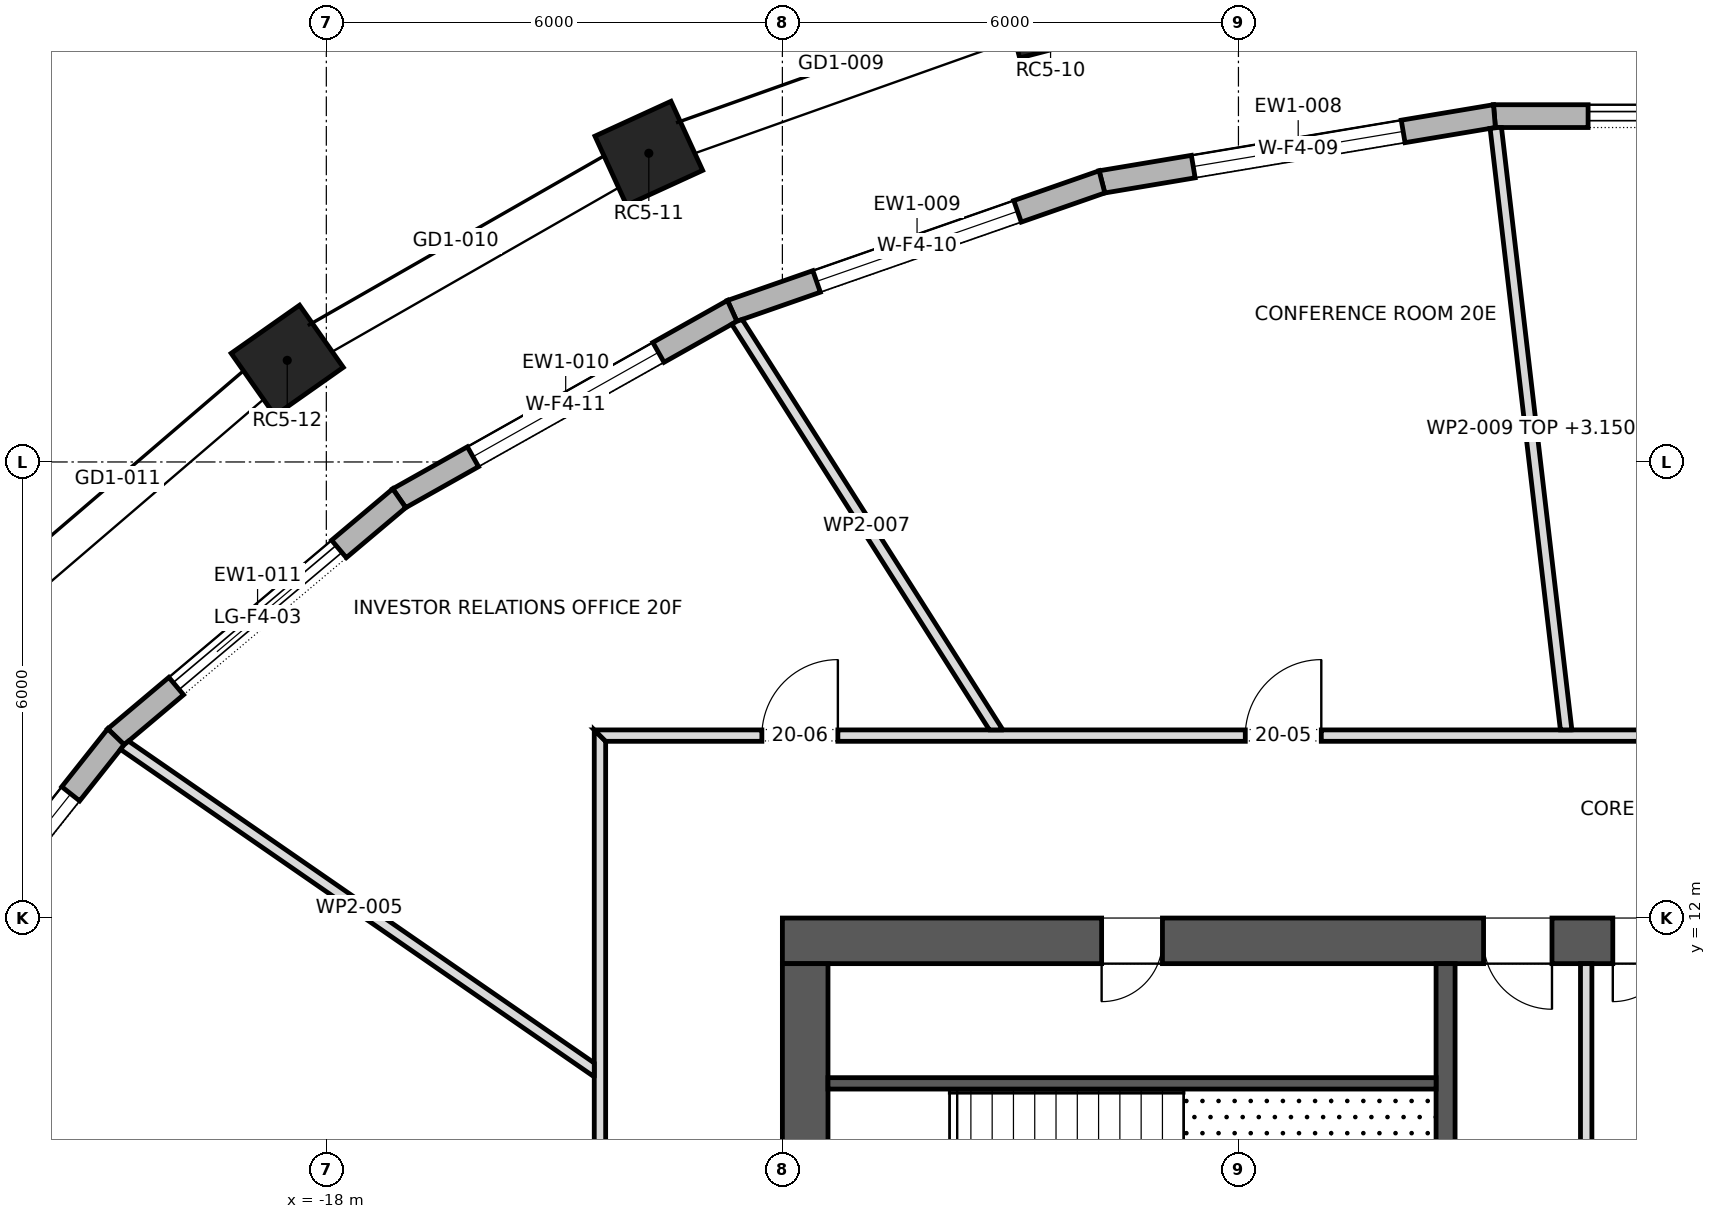
"""IFC4 building model, lengths in metres.
Left out: names, types, materials, properties, quantities, classifications, styles, units other than length and angle.
Written with IfcOpenShell. Run it as: python <this file> out.ifc"""

import sys

from ifc_helpers import new_model, si_unit, direction, frame, frame_2d, origin, origin_2d, place, context, subcontext, project, spatial, polyline, rectangle, outline, extrude, element, fill, save


model = new_model("IFC4")
c1 = context("Model", 3, precision=1e-05, world=origin(), true_north=direction((0.0, 1.0)))
c2 = subcontext(c1, "Body", "Model", "MODEL_VIEW")
j1 = project(units=[si_unit("LENGTHUNIT", "METRE"), si_unit("PLANEANGLEUNIT", "RADIAN")], contexts=[c1])
p1 = place(None, origin())
s1 = spatial("IfcSite", under=j1, at=p1, CompositionType="ELEMENT")
p2 = place(p1, origin())
s2 = spatial("IfcBuilding", under=s1, at=p2, CompositionType="ELEMENT")
p3 = place(p2, frame((0.0, 0.0, 288.3)))
s3 = spatial("IfcBuildingStorey", under=s2, at=p3, CompositionType="ELEMENT", Elevation=288.3)
for number, where, z_axis, x_axis in (
    (1, (-8.472, 23.938, 0.0), (0.0, 0.0, 1.0), (-0.968, -0.252, 0.0)),
    (2, (-13.757, 22.061, 0.0), (0.0, 0.0, 1.0), (-0.909, -0.417, 0.0)),
    (3, (-18.514, 19.337, 0.0), (0.0, 0.0, 1.0), (-0.818, -0.575, 0.0)),
):
    element("IfcColumn", number, at=place(p3, frame(where, z_axis=z_axis, x_axis=x_axis)), inside=s3, PredefinedType="COLUMN", context=c2, shape_type="SweptSolid", body=[
        extrude(rectangle(XDim=1.1, YDim=1.0, at=origin_2d()), origin(), (0.0, 0.0, 1.0), 4.0),
    ])
p4 = place(p3, frame((-12.0, 11.7, 0.0), z_axis=(0.0, 0.0, 1.0), x_axis=(1.0, 0.0, 0.0)))
e4 = element("IfcWall", 4, at=p4, inside=s3, PredefinedType="SHEAR", context=c2, shape_type="SweptSolid", body=[
    extrude(rectangle(XDim=24.0, YDim=0.6, at=frame_2d((12.0, 0.0))), origin(), (0.0, 0.0, 1.0), 4.0),
])
p5 = place(p4, frame((9.225, 0.0, 0.0)))
e5 = element("IfcOpeningElement", 5, at=p5, cuts=e4, PredefinedType="OPENING", context=c2, shape_type="SweptSolid", body=[
    extrude(rectangle(XDim=0.9, YDim=2.1, at=frame_2d((0.45, 1.05))), frame((0.0, 0.312, 0.0), z_axis=(0.0, -1.0, 0.0), x_axis=(1.0, 0.0, 0.0)), (0.0, 0.0, 1.0), 0.624),
])
p6 = place(p4, frame((10.925, 0.0, 0.0)))
e6 = element("IfcOpeningElement", 6, at=p6, cuts=e4, PredefinedType="OPENING", context=c2, shape_type="SweptSolid", body=[
    extrude(rectangle(XDim=0.8, YDim=2.1, at=frame_2d((0.4, 1.05))), frame((0.0, 0.312, 0.0), z_axis=(0.0, -1.0, 0.0), x_axis=(1.0, 0.0, 0.0)), (0.0, 0.0, 1.0), 0.624),
])
p7 = place(p4, frame((4.2, 0.0, 0.0)))
e7 = element("IfcOpeningElement", 7, at=p7, cuts=e4, PredefinedType="OPENING", context=c2, shape_type="SweptSolid", body=[
    extrude(rectangle(XDim=0.8, YDim=2.1, at=frame_2d((0.4, 1.05))), frame((0.0, 0.312, 0.0), z_axis=(0.0, -1.0, 0.0), x_axis=(1.0, 0.0, 0.0)), (0.0, 0.0, 1.0), 0.624),
])
p8 = place(p4, frame((13.8, 0.0, 0.0)))
e8 = element("IfcOpeningElement", 8, at=p8, cuts=e4, PredefinedType="OPENING", context=c2, shape_type="SweptSolid", body=[
    extrude(rectangle(XDim=0.8, YDim=2.1, at=frame_2d((0.4, 1.05))), frame((0.0, 0.312, 0.0), z_axis=(0.0, -1.0, 0.0), x_axis=(1.0, 0.0, 0.0)), (0.0, 0.0, 1.0), 0.624),
])
p9 = place(p4, frame((16.6, 0.0, 0.0)))
e9 = element("IfcOpeningElement", 9, at=p9, cuts=e4, PredefinedType="OPENING", context=c2, shape_type="SweptSolid", body=[
    extrude(rectangle(XDim=0.8, YDim=2.1, at=frame_2d((0.4, 1.05))), frame((0.0, 0.312, 0.0), z_axis=(0.0, -1.0, 0.0), x_axis=(1.0, 0.0, 0.0)), (0.0, 0.0, 1.0), 0.624),
])
p10 = place(p3, frame((-11.7, -11.4, 0.0), z_axis=(0.0, 0.0, 1.0), x_axis=(0.0, 1.0, 0.0)))
e10 = element("IfcWall", 10, at=p10, inside=s3, PredefinedType="SHEAR", context=c2, shape_type="SweptSolid", body=[
    extrude(rectangle(XDim=22.8, YDim=0.6, at=frame_2d((11.4, 0.0))), origin(), (0.0, 0.0, 1.0), 4.0),
])
p11 = place(p10, frame((10.2, 0.0, 0.0)))
e11 = element("IfcOpeningElement", 11, at=p11, cuts=e10, PredefinedType="OPENING", context=c2, shape_type="SweptSolid", body=[
    extrude(rectangle(XDim=2.4, YDim=2.1, at=frame_2d((1.2, 1.05))), frame((0.0, 0.312, 0.0), z_axis=(0.0, -1.0, 0.0), x_axis=(1.0, 0.0, 0.0)), (0.0, 0.0, 1.0), 0.624),
])
p12 = place(p10, frame((18.925, 0.0, 0.0)))
e12 = element("IfcOpeningElement", 12, at=p12, cuts=e10, PredefinedType="OPENING", context=c2, shape_type="SweptSolid", body=[
    extrude(rectangle(XDim=1.2, YDim=2.1, at=frame_2d((0.6, 1.05))), frame((0.0, 0.312, 0.0), z_axis=(0.0, -1.0, 0.0), x_axis=(1.0, 0.0, 0.0)), (0.0, 0.0, 1.0), 0.624),
])
p13 = place(p10, frame((2.675, 0.0, 0.0)))
e13 = element("IfcOpeningElement", 13, at=p13, cuts=e10, PredefinedType="OPENING", context=c2, shape_type="SweptSolid", body=[
    extrude(rectangle(XDim=1.2, YDim=2.1, at=frame_2d((0.6, 1.05))), frame((0.0, 0.312, 0.0), z_axis=(0.0, -1.0, 0.0), x_axis=(1.0, 0.0, 0.0)), (0.0, 0.0, 1.0), 0.624),
])
p14 = place(p3, frame((2.632, 22.55, 0.0), z_axis=(0.0, 0.0, 1.0), x_axis=(-1.0, 0.0, 0.0)))
e14 = element("IfcWall", 14, at=p14, inside=s3, PredefinedType="STANDARD", context=c2, shape_type="SweptSolid", body=[
    extrude(outline(polyline([(-0.012, -0.15), (5.277, -0.15), (5.252, 0.15), (0.012, 0.15), (-0.012, -0.15)])), origin(), (0.0, 0.0, 1.0), 3.7),
])
p15 = place(p14, frame((1.232, 0.0, 0.0)))
e15 = element("IfcOpeningElement", 15, at=p15, cuts=e14, PredefinedType="OPENING", context=c2, shape_type="SweptSolid", body=[
    extrude(rectangle(XDim=2.8, YDim=3.25, at=frame_2d((1.4, 1.625))), frame((0.0, 0.162, 0.0), z_axis=(0.0, -1.0, 0.0), x_axis=(1.0, 0.0, 0.0)), (0.0, 0.0, 1.0), 0.324),
])
p16 = place(p3, frame((-2.632, 22.55, 0.0), z_axis=(0.0, 0.0, 1.0), x_axis=(-0.986257472007, -0.165215613396, 0.0)))
e16 = element("IfcWall", 16, at=p16, inside=s3, PredefinedType="STANDARD", context=c2, shape_type="SweptSolid", body=[
    extrude(outline(polyline([(-0.012, -0.15), (5.248, -0.15), (5.223, 0.15), (0.012, 0.15), (-0.012, -0.15)])), origin(), (0.0, 0.0, 1.0), 3.7),
])
p17 = place(p16, frame((1.218, 0.0, 0.6)))
e17 = element("IfcOpeningElement", 17, at=p17, cuts=e16, PredefinedType="OPENING", context=c2, shape_type="SweptSolid", body=[
    extrude(rectangle(XDim=2.8, YDim=2.65, at=frame_2d((1.4, 1.325))), frame((0.0, 0.162, 0.0), z_axis=(0.0, -1.0, 0.0), x_axis=(1.0, 0.0, 0.0)), (0.0, 0.0, 1.0), 0.324),
])
p18 = place(p3, frame((-7.796, 21.685, 0.0), z_axis=(0.0, 0.0, 1.0), x_axis=(-0.944204293701, -0.329360367617, 0.0)))
e18 = element("IfcWall", 18, at=p18, inside=s3, PredefinedType="STANDARD", context=c2, shape_type="SweptSolid", body=[
    extrude(outline(polyline([(-0.013, -0.15), (5.166, -0.15), (5.139, 0.15), (0.013, 0.15), (-0.013, -0.15)])), origin(), (0.0, 0.0, 1.0), 3.7),
])
p19 = place(p18, frame((1.176, 0.0, 0.6)))
e19 = element("IfcOpeningElement", 19, at=p19, cuts=e18, PredefinedType="OPENING", context=c2, shape_type="SweptSolid", body=[
    extrude(rectangle(XDim=2.8, YDim=2.65, at=frame_2d((1.4, 1.325))), frame((0.0, 0.162, 0.0), z_axis=(0.0, -1.0, 0.0), x_axis=(1.0, 0.0, 0.0)), (0.0, 0.0, 1.0), 0.324),
])
p20 = place(p3, frame((-12.661, 19.988, 0.0), z_axis=(0.0, 0.0, 1.0), x_axis=(-0.871488606878, -0.490415750239, 0.0)))
e20 = element("IfcWall", 20, at=p20, inside=s3, PredefinedType="STANDARD", context=c2, shape_type="SweptSolid", body=[
    extrude(outline(polyline([(-0.013, -0.15), (5.04, -0.15), (5.012, 0.15), (0.013, 0.15), (-0.013, -0.15)])), origin(), (0.0, 0.0, 1.0), 3.7),
])
p21 = place(p20, frame((1.113, 0.0, 0.6)))
e21 = element("IfcOpeningElement", 21, at=p21, cuts=e20, PredefinedType="OPENING", context=c2, shape_type="SweptSolid", body=[
    extrude(rectangle(XDim=2.8, YDim=2.65, at=frame_2d((1.4, 1.325))), frame((0.0, 0.162, 0.0), z_axis=(0.0, -1.0, 0.0), x_axis=(1.0, 0.0, 0.0)), (0.0, 0.0, 1.0), 0.324),
])
p22 = place(p3, frame((-17.041, 17.523, 0.0), z_axis=(0.0, 0.0, 1.0), x_axis=(-0.764876116592, -0.644177402792, 0.0)))
e22 = element("IfcWall", 22, at=p22, inside=s3, PredefinedType="STANDARD", context=c2, shape_type="SweptSolid", body=[
    extrude(outline(polyline([(-0.014, -0.15), (4.888, -0.15), (4.858, 0.15), (0.014, 0.15), (-0.014, -0.15)])), origin(), (0.0, 0.0, 1.0), 3.7),
])
p23 = place(p22, frame((1.036, 0.0, 0.0)))
e23 = element("IfcOpeningElement", 23, at=p23, cuts=e22, PredefinedType="OPENING", context=c2, shape_type="SweptSolid", body=[
    extrude(rectangle(XDim=2.8, YDim=3.25, at=frame_2d((1.4, 1.625))), frame((0.0, 0.162, 0.0), z_axis=(0.0, -1.0, 0.0), x_axis=(1.0, 0.0, 0.0)), (0.0, 0.0, 1.0), 0.324),
])
p24 = place(p3, frame((-20.768, 14.384, 0.0), z_axis=(0.0, 0.0, 1.0), x_axis=(-0.621544881236, -0.783378555112, 0.0)))
e24 = element("IfcWall", 24, at=p24, inside=s3, PredefinedType="STANDARD", context=c2, shape_type="SweptSolid", body=[
    extrude(outline(polyline([(-0.015, -0.15), (4.73, -0.15), (4.698, 0.15), (0.015, 0.15), (-0.015, -0.15)])), origin(), (0.0, 0.0, 1.0), 3.7),
])
p25 = place(p24, frame((0.957, 0.0, 0.6)))
e25 = element("IfcOpeningElement", 25, at=p25, cuts=e24, PredefinedType="OPENING", context=c2, shape_type="SweptSolid", body=[
    extrude(rectangle(XDim=2.8, YDim=2.65, at=frame_2d((1.4, 1.325))), frame((0.0, 0.162, 0.0), z_axis=(0.0, -1.0, 0.0), x_axis=(1.0, 0.0, 0.0)), (0.0, 0.0, 1.0), 0.324),
])
p26 = place(p3, frame((-3.275, 6.5, 0.0), z_axis=(0.0, 0.0, 1.0), x_axis=(0.0, 1.0, 0.0)))
e26 = element("IfcWall", 26, at=p26, inside=s3, PredefinedType="SHEAR", context=c2, shape_type="SweptSolid", body=[
    extrude(rectangle(XDim=4.9, YDim=0.25, at=frame_2d((2.45, 0.0))), origin(), (0.0, 0.0, 1.0), 3.7),
])
p27 = place(p3, frame((-11.4, 9.825, 0.0), z_axis=(0.0, 0.0, 1.0), x_axis=(1.0, 0.0, 0.0)))
e27 = element("IfcWall", 27, at=p27, inside=s3, PredefinedType="SHEAR", context=c2, shape_type="SweptSolid", body=[
    extrude(rectangle(XDim=8.0, YDim=0.15, at=frame_2d((4.0, 0.0))), origin(), (0.0, 0.0, 1.0), 3.7),
])
p28 = place(p3, frame((-1.425, 6.5, 0.0), z_axis=(0.0, 0.0, 1.0), x_axis=(0.0, 1.0, 0.0)))
e28 = element("IfcWall", 28, at=p28, inside=s3, PredefinedType="PARTITIONING", context=c2, shape_type="SweptSolid", body=[
    extrude(rectangle(XDim=4.9, YDim=0.15, at=frame_2d((2.45, 0.0))), origin(), (0.0, 0.0, 1.0), 3.7),
])
p29 = place(p3, frame((-14.4, -14.475, 0.0), z_axis=(0.0, 0.0, 1.0), x_axis=(0.0, 1.0, 0.0)))
e29 = element("IfcWall", 29, at=p29, inside=s3, PredefinedType="PARTITIONING", context=c2, shape_type="SweptSolid", body=[
    extrude(outline(polyline([(0.15, -0.075), (2.06, -0.075), (3.97, -0.075), (5.88, -0.075), (7.79, -0.075), (9.7, -0.075), (11.61, -0.075), (13.52, -0.075), (15.43, -0.075), (17.34, -0.075), (19.25, -0.075), (21.16, -0.075), (23.07, -0.075), (24.98, -0.075), (26.89, -0.075), (28.8, -0.075), (28.95, 0.075), (27.02, 0.075), (25.09, 0.075), (23.16, 0.075), (21.23, 0.075), (19.3, 0.075), (17.37, 0.075), (15.44, 0.075), (13.51, 0.075), (11.58, 0.075), (9.65, 0.075), (7.72, 0.075), (5.79, 0.075), (3.86, 0.075), (1.93, 0.075), (0.0, 0.075), (0.15, -0.075)])), origin(), (0.0, 0.0, 1.0), 3.7),
])
p30 = place(p29, frame((19.545, 0.0, 0.0)))
e30 = element("IfcOpeningElement", 30, at=p30, cuts=e29, PredefinedType="OPENING", context=c2, shape_type="SweptSolid", body=[
    extrude(rectangle(XDim=1.0, YDim=2.1, at=frame_2d((0.5, 1.05))), frame((0.0, 0.087, 0.0), z_axis=(0.0, -1.0, 0.0), x_axis=(1.0, 0.0, 0.0)), (0.0, 0.0, 1.0), 0.174),
])
p31 = place(p29, frame((11.33, 0.0, 0.0)))
e31 = element("IfcOpeningElement", 31, at=p31, cuts=e29, PredefinedType="OPENING", context=c2, shape_type="SweptSolid", body=[
    extrude(rectangle(XDim=1.0, YDim=2.1, at=frame_2d((0.5, 1.05))), frame((0.0, 0.087, 0.0), z_axis=(0.0, -1.0, 0.0), x_axis=(1.0, 0.0, 0.0)), (0.0, 0.0, 1.0), 0.174),
])
p32 = place(p3, frame((-14.433, 9.972, 0.0), z_axis=(0.0, 0.0, 1.0), x_axis=(-0.822596869136, 0.568625000231, 0.0)))
e32 = element("IfcWall", 32, at=p32, inside=s3, PredefinedType="PARTITIONING", context=c2, shape_type="SweptSolid", body=[
    extrude(outline(polyline([(0.103, -0.075), (1.965, -0.075), (3.827, -0.075), (5.689, -0.075), (7.551, -0.075), (7.571, -0.002), (7.576, 0.069), (7.576, 0.075), (5.682, 0.075), (3.788, 0.075), (1.894, 0.075), (0.0, 0.075), (0.0, 0.074), (0.103, -0.075)])), origin(), (0.0, 0.0, 1.0), 3.7),
])
p33 = place(p3, frame((-14.475, 14.4, 0.0), z_axis=(0.0, 0.0, 1.0), x_axis=(1.0, 0.0, 0.0)))
e33 = element("IfcWall", 33, at=p33, inside=s3, PredefinedType="PARTITIONING", context=c2, shape_type="SweptSolid", body=[
    extrude(outline(polyline([(0.15, -0.075), (2.06, -0.075), (3.97, -0.075), (5.88, -0.075), (7.79, -0.075), (9.7, -0.075), (11.61, -0.075), (13.52, -0.075), (15.43, -0.075), (17.34, -0.075), (19.25, -0.075), (21.16, -0.075), (23.07, -0.075), (24.98, -0.075), (26.89, -0.075), (28.8, -0.075), (28.95, 0.075), (27.02, 0.075), (25.09, 0.075), (23.16, 0.075), (21.23, 0.075), (19.3, 0.075), (17.37, 0.075), (15.44, 0.075), (13.51, 0.075), (11.58, 0.075), (9.65, 0.075), (7.72, 0.075), (5.79, 0.075), (3.86, 0.075), (1.93, 0.075), (0.0, 0.075), (0.15, -0.075)])), origin(), (0.0, 0.0, 1.0), 3.7),
])
p34 = place(p33, frame((20.15, 0.0, 0.0)))
e34 = element("IfcOpeningElement", 34, at=p34, cuts=e33, PredefinedType="OPENING", context=c2, shape_type="SweptSolid", body=[
    extrude(rectangle(XDim=1.0, YDim=2.1, at=frame_2d((0.5, 1.05))), frame((0.0, 0.087, 0.0), z_axis=(0.0, -1.0, 0.0), x_axis=(1.0, 0.0, 0.0)), (0.0, 0.0, 1.0), 0.174),
])
p35 = place(p33, frame((8.565, 0.0, 0.0)))
e35 = element("IfcOpeningElement", 35, at=p35, cuts=e33, PredefinedType="OPENING", context=c2, shape_type="SweptSolid", body=[
    extrude(rectangle(XDim=1.0, YDim=2.1, at=frame_2d((0.5, 1.05))), frame((0.0, 0.087, 0.0), z_axis=(0.0, -1.0, 0.0), x_axis=(1.0, 0.0, 0.0)), (0.0, 0.0, 1.0), 0.174),
])
p36 = place(p33, frame((2.205, 0.0, 0.0)))
e36 = element("IfcOpeningElement", 36, at=p36, cuts=e33, PredefinedType="OPENING", context=c2, shape_type="SweptSolid", body=[
    extrude(rectangle(XDim=1.0, YDim=2.1, at=frame_2d((0.5, 1.05))), frame((0.0, 0.087, 0.0), z_axis=(0.0, -1.0, 0.0), x_axis=(1.0, 0.0, 0.0)), (0.0, 0.0, 1.0), 0.174),
])
p37 = place(p3, frame((-9.162, 14.435, 0.0), z_axis=(0.0, 0.0, 1.0), x_axis=(-0.536136809147, 0.844131104674, 0.0)))
e37 = element("IfcWall", 37, at=p37, inside=s3, PredefinedType="PARTITIONING", context=c2, shape_type="SweptSolid", body=[
    extrude(outline(polyline([(0.0, -0.075), (1.599, -0.075), (3.198, -0.075), (4.798, -0.075), (6.397, -0.075), (6.414, -0.002), (6.417, 0.066), (6.417, 0.075), (4.837, 0.075), (3.256, 0.075), (1.676, 0.075), (0.095, 0.075), (0.0, -0.074), (0.0, -0.075)])), origin(), (0.0, 0.0, 1.0), 3.7),
])
p38 = place(p3, frame((-1.688, 14.467, 0.0), z_axis=(0.0, 0.0, 1.0), x_axis=(-0.116071250105, 0.993240889663, 0.0)))
e38 = element("IfcWall", 38, at=p38, inside=s3, PredefinedType="PARTITIONING", context=c2, shape_type="SweptSolid", body=[
    extrude(outline(polyline([(0.0, -0.075), (1.995, -0.075), (3.989, -0.075), (5.984, -0.075), (7.979, -0.075), (7.984, -0.025), (7.984, 0.075), (5.993, 0.075), (4.001, 0.075), (2.009, 0.075), (0.017, 0.075), (0.0, -0.073), (0.0, -0.075)])), origin(), (0.0, 0.0, 1.0), 3.15),
])
p39 = place(p15, origin())
e39 = element("IfcDoor", 39, at=p39, inside=s3, OperationType="DOUBLE_DOOR_SLIDING", PredefinedType="DOOR", context=c2, shape_type="SweptSolid", body=[
    extrude(rectangle(XDim=2.8, YDim=3.25, at=frame_2d((1.4, 1.625))), frame((0.0, 0.025, 0.0), z_axis=(0.0, -1.0, 0.0), x_axis=(1.0, 0.0, 0.0)), (0.0, 0.0, 1.0), 0.05),
])
fill(e15, e39)
p40 = place(p17, origin())
e40 = element("IfcWindow", 40, at=p40, inside=s3, PartitioningType="DOUBLE_PANEL_VERTICAL", PredefinedType="WINDOW", context=c2, shape_type="SweptSolid", body=[
    extrude(rectangle(XDim=2.8, YDim=2.65, at=frame_2d((1.4, 1.325))), frame((0.0, 0.03, 0.0), z_axis=(0.0, -1.0, 0.0), x_axis=(1.0, 0.0, 0.0)), (0.0, 0.0, 1.0), 0.06),
])
fill(e17, e40)
p41 = place(p19, origin())
e41 = element("IfcWindow", 41, at=p41, inside=s3, PartitioningType="DOUBLE_PANEL_VERTICAL", PredefinedType="WINDOW", context=c2, shape_type="SweptSolid", body=[
    extrude(rectangle(XDim=2.8, YDim=2.65, at=frame_2d((1.4, 1.325))), frame((0.0, 0.03, 0.0), z_axis=(0.0, -1.0, 0.0), x_axis=(1.0, 0.0, 0.0)), (0.0, 0.0, 1.0), 0.06),
])
fill(e19, e41)
p42 = place(p21, origin())
e42 = element("IfcWindow", 42, at=p42, inside=s3, PartitioningType="DOUBLE_PANEL_VERTICAL", PredefinedType="WINDOW", context=c2, shape_type="SweptSolid", body=[
    extrude(rectangle(XDim=2.8, YDim=2.65, at=frame_2d((1.4, 1.325))), frame((0.0, 0.03, 0.0), z_axis=(0.0, -1.0, 0.0), x_axis=(1.0, 0.0, 0.0)), (0.0, 0.0, 1.0), 0.06),
])
fill(e21, e42)
p43 = place(p23, origin())
e43 = element("IfcDoor", 43, at=p43, inside=s3, OperationType="DOUBLE_DOOR_SLIDING", PredefinedType="DOOR", context=c2, shape_type="SweptSolid", body=[
    extrude(rectangle(XDim=2.8, YDim=3.25, at=frame_2d((1.4, 1.625))), frame((0.0, 0.025, 0.0), z_axis=(0.0, -1.0, 0.0), x_axis=(1.0, 0.0, 0.0)), (0.0, 0.0, 1.0), 0.05),
])
fill(e23, e43)
p44 = place(p25, origin())
e44 = element("IfcWindow", 44, at=p44, inside=s3, PartitioningType="DOUBLE_PANEL_VERTICAL", PredefinedType="WINDOW", context=c2, shape_type="SweptSolid", body=[
    extrude(rectangle(XDim=2.8, YDim=2.65, at=frame_2d((1.4, 1.325))), frame((0.0, 0.03, 0.0), z_axis=(0.0, -1.0, 0.0), x_axis=(1.0, 0.0, 0.0)), (0.0, 0.0, 1.0), 0.06),
])
fill(e25, e44)
p45 = place(p5, frame((0.9, 0.0, 0.0), z_axis=(0.0, 0.0, 1.0), x_axis=(-1.0, 0.0, 0.0)))
e45 = element("IfcDoor", 45, at=p45, inside=s3, OperationType="SINGLE_SWING_RIGHT", PredefinedType="DOOR", context=c2, shape_type="SweptSolid", body=[
    extrude(rectangle(XDim=0.9, YDim=2.1, at=frame_2d((0.45, 1.05))), frame((0.0, 0.025, 0.0), z_axis=(0.0, -1.0, 0.0), x_axis=(1.0, 0.0, 0.0)), (0.0, 0.0, 1.0), 0.05),
])
fill(e5, e45)
p46 = place(p6, frame((0.8, 0.0, 0.0), z_axis=(0.0, 0.0, 1.0), x_axis=(-1.0, 0.0, 0.0)))
e46 = element("IfcDoor", 46, at=p46, inside=s3, OperationType="SINGLE_SWING_LEFT", PredefinedType="DOOR", context=c2, shape_type="SweptSolid", body=[
    extrude(rectangle(XDim=0.8, YDim=2.1, at=frame_2d((0.4, 1.05))), frame((0.0, 0.025, 0.0), z_axis=(0.0, -1.0, 0.0), x_axis=(1.0, 0.0, 0.0)), (0.0, 0.0, 1.0), 0.05),
])
fill(e6, e46)
p47 = place(p7, frame((0.8, 0.0, 0.0), z_axis=(0.0, 0.0, 1.0), x_axis=(-1.0, 0.0, 0.0)))
e47 = element("IfcDoor", 47, at=p47, inside=s3, OperationType="SINGLE_SWING_LEFT", PredefinedType="DOOR", context=c2, shape_type="SweptSolid", body=[
    extrude(rectangle(XDim=0.8, YDim=2.1, at=frame_2d((0.4, 1.05))), frame((0.0, 0.025, 0.0), z_axis=(0.0, -1.0, 0.0), x_axis=(1.0, 0.0, 0.0)), (0.0, 0.0, 1.0), 0.05),
])
fill(e7, e47)
p48 = place(p35, origin())
e48 = element("IfcDoor", 48, at=p48, inside=s3, OperationType="SINGLE_SWING_LEFT", PredefinedType="DOOR", context=c2, shape_type="SweptSolid", body=[
    extrude(rectangle(XDim=1.0, YDim=2.1, at=frame_2d((0.5, 1.05))), frame((0.0, 0.025, 0.0), z_axis=(0.0, -1.0, 0.0), x_axis=(1.0, 0.0, 0.0)), (0.0, 0.0, 1.0), 0.05),
])
fill(e35, e48)
p49 = place(p36, origin())
e49 = element("IfcDoor", 49, at=p49, inside=s3, OperationType="SINGLE_SWING_LEFT", PredefinedType="DOOR", context=c2, shape_type="SweptSolid", body=[
    extrude(rectangle(XDim=1.0, YDim=2.1, at=frame_2d((0.5, 1.05))), frame((0.0, 0.025, 0.0), z_axis=(0.0, -1.0, 0.0), x_axis=(1.0, 0.0, 0.0)), (0.0, 0.0, 1.0), 0.05),
])
fill(e36, e49)
save(model, sys.argv[1])
